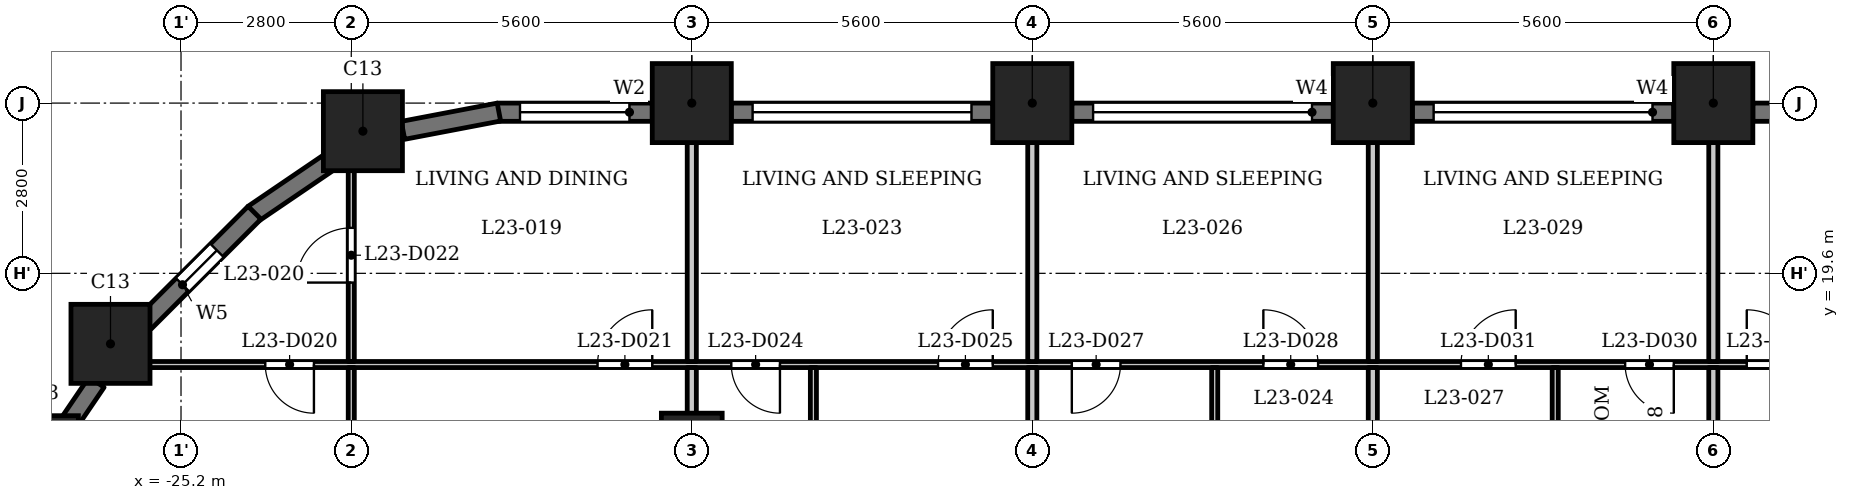
"""IFC4 building model, lengths in metres.
Left out: names, types, materials, properties, quantities, classifications, styles, units other than length and angle.
Written with IfcOpenShell. Run it as: python <this file> out.ifc"""

import sys

from ifc_helpers import new_model, si_unit, direction, frame, frame_2d, origin, origin_2d, place, context, subcontext, project, spatial, rectangle, extrude, element, fill, save


model = new_model("IFC4")
c1 = context("Model", 3, precision=1e-05, world=origin(), true_north=direction((0.0, 1.0)))
c2 = subcontext(c1, "Body", "Model", "MODEL_VIEW")
j1 = project(units=[si_unit("LENGTHUNIT", "METRE"), si_unit("PLANEANGLEUNIT", "RADIAN")], contexts=[c1])
p1 = place(None, origin())
s1 = spatial("IfcSite", under=j1, at=p1, CompositionType="ELEMENT")
p2 = place(p1, origin())
s2 = spatial("IfcBuilding", under=s1, at=p2, CompositionType="ELEMENT")
p3 = place(p2, frame((0.0, 0.0, 93.8)))
s3 = spatial("IfcBuildingStorey", under=s2, at=p3, CompositionType="ELEMENT", Elevation=93.8)
for number, where, z_axis, x_axis in (
    (1, (0.0, 22.4, 0.0), (0.0, 0.0, 1.0), (1.0, 0.0, 0.0)),
    (2, (-5.6, 22.4, 0.0), (0.0, 0.0, 1.0), (1.0, 0.0, 0.0)),
    (3, (-11.2, 22.4, 0.0), (0.0, 0.0, 1.0), (1.0, 0.0, 0.0)),
    (4, (-16.8, 22.4, 0.0), (0.0, 0.0, 1.0), (1.0, 0.0, 0.0)),
    (5, (-22.209, 21.938, 0.0), (0.0, 0.0, 1.0), (1.0, 0.0, 0.0)),
    (6, (-26.36, 18.44, 0.0), (0.0, 0.0, 1.0), (1.0, 0.0, 0.0)),
    (7, (-27.538, 16.609, 0.0), (0.0, 0.0, 1.0), (1.0, 0.0, 0.0)),
):
    element("IfcColumn", number, at=place(p3, frame(where, z_axis=z_axis, x_axis=x_axis)), inside=s3, PredefinedType="COLUMN", context=c2, shape_type="SweptSolid", body=[
        extrude(rectangle(XDim=1.3, YDim=1.3, at=origin_2d()), origin(), (0.0, 0.0, 1.0), 3.5),
    ])
p4 = place(p3, frame((-16.8, 16.8, 0.0), z_axis=(0.0, 0.0, 1.0), x_axis=(1.0, 0.0, 0.0)))
e8 = element("IfcColumn", 8, at=p4, inside=s3, PredefinedType="COLUMN", context=c2, shape_type="SweptSolid", body=[
    extrude(rectangle(XDim=1.0, YDim=1.0, at=origin_2d()), origin(), (0.0, 0.0, 1.0), 3.5),
])
p5 = place(p3, frame((4.95, 22.25, 0.0), z_axis=(0.0, 0.0, 1.0), x_axis=(-1.0, 0.0, 0.0)))
e9 = element("IfcWall", 9, at=p5, inside=s3, PredefinedType="SOLIDWALL", context=c2, shape_type="SweptSolid", body=[
    extrude(rectangle(XDim=4.3, YDim=0.3, at=frame_2d((2.15, 0.0))), origin(), (0.0, 0.0, 1.0), 2.4),
])
p6 = place(p5, frame((0.35, 0.0, 1.2)))
e10 = element("IfcOpeningElement", 10, at=p6, cuts=e9, PredefinedType="OPENING", context=c2, shape_type="SweptSolid", body=[
    extrude(rectangle(XDim=3.6, YDim=0.95, at=frame_2d((1.8, 0.475))), frame((0.0, 0.16, 0.0), z_axis=(0.0, -1.0, 0.0), x_axis=(1.0, 0.0, 0.0)), (0.0, 0.0, 1.0), 0.32),
])
p7 = place(p3, frame((-0.65, 22.25, 0.0), z_axis=(0.0, 0.0, 1.0), x_axis=(-1.0, 0.0, 0.0)))
e11 = element("IfcWall", 11, at=p7, inside=s3, PredefinedType="SOLIDWALL", context=c2, shape_type="SweptSolid", body=[
    extrude(rectangle(XDim=4.3, YDim=0.3, at=frame_2d((2.15, 0.0))), origin(), (0.0, 0.0, 1.0), 2.4),
])
p8 = place(p7, frame((0.35, 0.0, 1.2)))
e12 = element("IfcOpeningElement", 12, at=p8, cuts=e11, PredefinedType="OPENING", context=c2, shape_type="SweptSolid", body=[
    extrude(rectangle(XDim=3.6, YDim=0.95, at=frame_2d((1.8, 0.475))), frame((0.0, 0.16, 0.0), z_axis=(0.0, -1.0, 0.0), x_axis=(1.0, 0.0, 0.0)), (0.0, 0.0, 1.0), 0.32),
])
p9 = place(p3, frame((-6.25, 22.25, 0.0), z_axis=(0.0, 0.0, 1.0), x_axis=(-1.0, 0.0, 0.0)))
e13 = element("IfcWall", 13, at=p9, inside=s3, PredefinedType="SOLIDWALL", context=c2, shape_type="SweptSolid", body=[
    extrude(rectangle(XDim=4.3, YDim=0.3, at=frame_2d((2.15, 0.0))), origin(), (0.0, 0.0, 1.0), 2.4),
])
p10 = place(p9, frame((0.35, 0.0, 1.2)))
e14 = element("IfcOpeningElement", 14, at=p10, cuts=e13, PredefinedType="OPENING", context=c2, shape_type="SweptSolid", body=[
    extrude(rectangle(XDim=3.6, YDim=0.95, at=frame_2d((1.8, 0.475))), frame((0.0, 0.16, 0.0), z_axis=(0.0, -1.0, 0.0), x_axis=(1.0, 0.0, 0.0)), (0.0, 0.0, 1.0), 0.32),
])
p11 = place(p3, frame((-11.85, 22.25, 0.0), z_axis=(0.0, 0.0, 1.0), x_axis=(-1.0, 0.0, 0.0)))
e15 = element("IfcWall", 15, at=p11, inside=s3, PredefinedType="SOLIDWALL", context=c2, shape_type="SweptSolid", body=[
    extrude(rectangle(XDim=4.3, YDim=0.3, at=frame_2d((2.15, 0.0))), origin(), (0.0, 0.0, 1.0), 2.4),
])
p12 = place(p11, frame((0.35, 0.0, 1.2)))
e16 = element("IfcOpeningElement", 16, at=p12, cuts=e15, PredefinedType="OPENING", context=c2, shape_type="SweptSolid", body=[
    extrude(rectangle(XDim=3.6, YDim=0.95, at=frame_2d((1.8, 0.475))), frame((0.0, 0.16, 0.0), z_axis=(0.0, -1.0, 0.0), x_axis=(1.0, 0.0, 0.0)), (0.0, 0.0, 1.0), 0.32),
])
p13 = place(p3, frame((-17.45, 22.25, 0.0), z_axis=(0.0, 0.0, 1.0), x_axis=(-1.0, 0.0, 0.0)))
e17 = element("IfcWall", 17, at=p13, inside=s3, PredefinedType="SOLIDWALL", context=c2, shape_type="SweptSolid", body=[
    extrude(rectangle(XDim=2.55, YDim=0.3, at=frame_2d((1.275, 0.0))), origin(), (0.0, 0.0, 1.0), 2.4),
])
p14 = place(p13, frame((0.375, 0.0, 0.9)))
e18 = element("IfcOpeningElement", 18, at=p14, cuts=e17, PredefinedType="OPENING", context=c2, shape_type="SweptSolid", body=[
    extrude(rectangle(XDim=1.8, YDim=1.25, at=frame_2d((0.9, 0.625))), frame((0.0, 0.16, 0.0), z_axis=(0.0, -1.0, 0.0), x_axis=(1.0, 0.0, 0.0)), (0.0, 0.0, 1.0), 0.32),
])
for number, where, z_axis, x_axis in (
    (19, (-19.972, 22.253, 0.0), (0.0, 0.0, 1.0), (-0.982, -0.187, 0.0)),
    (20, (-22.684, 21.482, 0.0), (0.0, 0.0, 1.0), (-0.827, -0.562, 0.0)),
):
    element("IfcWall", number, at=place(p3, frame(where, z_axis=z_axis, x_axis=x_axis)), inside=s3, PredefinedType="SOLIDWALL", context=c2, shape_type="SweptSolid", body=[
        extrude(rectangle(XDim=1.606, YDim=0.3, at=frame_2d((0.803, 0.0))), origin(), (0.0, 0.0, 1.0), 2.4),
    ])
p15 = place(p3, frame((-23.991, 20.597, 0.0), z_axis=(0.0, 0.0, 1.0), x_axis=(-0.707106781187, -0.707106781187, 0.0)))
e21 = element("IfcWall", 21, at=p15, inside=s3, PredefinedType="SOLIDWALL", context=c2, shape_type="SweptSolid", body=[
    extrude(rectangle(XDim=2.55, YDim=0.3, at=frame_2d((1.275, 0.0))), origin(), (0.0, 0.0, 1.0), 2.4),
])
p16 = place(p15, frame((0.875, 0.0, 0.6)))
e22 = element("IfcOpeningElement", 22, at=p16, cuts=e21, PredefinedType="OPENING", context=c2, shape_type="SweptSolid", body=[
    extrude(rectangle(XDim=0.8, YDim=1.55, at=frame_2d((0.4, 0.775))), frame((0.0, 0.16, 0.0), z_axis=(0.0, -1.0, 0.0), x_axis=(1.0, 0.0, 0.0)), (0.0, 0.0, 1.0), 0.32),
])
p17 = place(p3, frame((-26.589, 17.81, 0.0), z_axis=(0.0, 0.0, 1.0), x_axis=(-0.562066330934, -0.827092159091, 0.0)))
e23 = element("IfcWall", 23, at=p17, inside=s3, PredefinedType="SOLIDWALL", context=c2, shape_type="SweptSolid", body=[
    extrude(rectangle(XDim=0.877, YDim=0.3, at=frame_2d((0.438, 0.0))), origin(), (0.0, 0.0, 1.0), 3.2),
])
p18 = place(p3, frame((-26.44, 18.1, 0.0), z_axis=(0.0, 0.0, 1.0), x_axis=(1.0, 0.0, 0.0)))
e24 = element("IfcWall", 24, at=p18, inside=s3, PredefinedType="PARTITIONING", context=c2, shape_type="SweptSolid", body=[
    extrude(rectangle(XDim=52.63, YDim=0.1, at=frame_2d((26.315, 0.0))), origin(), (0.0, 0.0, 1.0), 3.2),
])
p19 = place(p18, frame((2.626, 0.0, 0.0)))
e25 = element("IfcOpeningElement", 25, at=p19, cuts=e24, PredefinedType="OPENING", context=c2, shape_type="SweptSolid", body=[
    extrude(rectangle(XDim=0.8, YDim=2.1, at=frame_2d((0.4, 1.05))), frame((0.0, 0.06, 0.0), z_axis=(0.0, -1.0, 0.0), x_axis=(1.0, 0.0, 0.0)), (0.0, 0.0, 1.0), 0.12),
])
p20 = place(p18, frame((8.09, 0.0, 0.0)))
e26 = element("IfcOpeningElement", 26, at=p20, cuts=e24, PredefinedType="OPENING", context=c2, shape_type="SweptSolid", body=[
    extrude(rectangle(XDim=0.9, YDim=2.1, at=frame_2d((0.45, 1.05))), frame((0.0, 0.06, 0.0), z_axis=(0.0, -1.0, 0.0), x_axis=(1.0, 0.0, 0.0)), (0.0, 0.0, 1.0), 0.12),
])
p21 = place(p18, frame((10.29, 0.0, 0.0)))
e27 = element("IfcOpeningElement", 27, at=p21, cuts=e24, PredefinedType="OPENING", context=c2, shape_type="SweptSolid", body=[
    extrude(rectangle(XDim=0.8, YDim=2.1, at=frame_2d((0.4, 1.05))), frame((0.0, 0.06, 0.0), z_axis=(0.0, -1.0, 0.0), x_axis=(1.0, 0.0, 0.0)), (0.0, 0.0, 1.0), 0.12),
])
p22 = place(p18, frame((13.69, 0.0, 0.0)))
e28 = element("IfcOpeningElement", 28, at=p22, cuts=e24, PredefinedType="OPENING", context=c2, shape_type="SweptSolid", body=[
    extrude(rectangle(XDim=0.9, YDim=2.1, at=frame_2d((0.45, 1.05))), frame((0.0, 0.06, 0.0), z_axis=(0.0, -1.0, 0.0), x_axis=(1.0, 0.0, 0.0)), (0.0, 0.0, 1.0), 0.12),
])
p23 = place(p18, frame((15.89, 0.0, 0.0)))
e29 = element("IfcOpeningElement", 29, at=p23, cuts=e24, PredefinedType="OPENING", context=c2, shape_type="SweptSolid", body=[
    extrude(rectangle(XDim=0.8, YDim=2.1, at=frame_2d((0.4, 1.05))), frame((0.0, 0.06, 0.0), z_axis=(0.0, -1.0, 0.0), x_axis=(1.0, 0.0, 0.0)), (0.0, 0.0, 1.0), 0.12),
])
p24 = place(p18, frame((19.04, 0.0, 0.0)))
e30 = element("IfcOpeningElement", 30, at=p24, cuts=e24, PredefinedType="OPENING", context=c2, shape_type="SweptSolid", body=[
    extrude(rectangle(XDim=0.9, YDim=2.1, at=frame_2d((0.45, 1.05))), frame((0.0, 0.06, 0.0), z_axis=(0.0, -1.0, 0.0), x_axis=(1.0, 0.0, 0.0)), (0.0, 0.0, 1.0), 0.12),
])
p25 = place(p18, frame((24.99, 0.0, 0.0)))
e31 = element("IfcOpeningElement", 31, at=p25, cuts=e24, PredefinedType="OPENING", context=c2, shape_type="SweptSolid", body=[
    extrude(rectangle(XDim=0.8, YDim=2.1, at=frame_2d((0.4, 1.05))), frame((0.0, 0.06, 0.0), z_axis=(0.0, -1.0, 0.0), x_axis=(1.0, 0.0, 0.0)), (0.0, 0.0, 1.0), 0.12),
])
p26 = place(p18, frame((22.29, 0.0, 0.0)))
e32 = element("IfcOpeningElement", 32, at=p26, cuts=e24, PredefinedType="OPENING", context=c2, shape_type="SweptSolid", body=[
    extrude(rectangle(XDim=0.9, YDim=2.1, at=frame_2d((0.45, 1.05))), frame((0.0, 0.06, 0.0), z_axis=(0.0, -1.0, 0.0), x_axis=(1.0, 0.0, 0.0)), (0.0, 0.0, 1.0), 0.12),
])
p27 = place(p18, frame((32.69, 0.0, 0.0)))
e33 = element("IfcOpeningElement", 33, at=p27, cuts=e24, PredefinedType="OPENING", context=c2, shape_type="SweptSolid", body=[
    extrude(rectangle(XDim=0.8, YDim=2.1, at=frame_2d((0.4, 1.05))), frame((0.0, 0.06, 0.0), z_axis=(0.0, -1.0, 0.0), x_axis=(1.0, 0.0, 0.0)), (0.0, 0.0, 1.0), 0.12),
])
p28 = place(p18, frame((26.99, 0.0, 0.0)))
e34 = element("IfcOpeningElement", 34, at=p28, cuts=e24, PredefinedType="OPENING", context=c2, shape_type="SweptSolid", body=[
    extrude(rectangle(XDim=0.9, YDim=2.1, at=frame_2d((0.45, 1.05))), frame((0.0, 0.06, 0.0), z_axis=(0.0, -1.0, 0.0), x_axis=(1.0, 0.0, 0.0)), (0.0, 0.0, 1.0), 0.12),
])
p29 = place(p18, frame((41.29, 0.0, 0.0)))
e35 = element("IfcOpeningElement", 35, at=p29, cuts=e24, PredefinedType="OPENING", context=c2, shape_type="SweptSolid", body=[
    extrude(rectangle(XDim=0.8, YDim=2.1, at=frame_2d((0.4, 1.05))), frame((0.0, 0.06, 0.0), z_axis=(0.0, -1.0, 0.0), x_axis=(1.0, 0.0, 0.0)), (0.0, 0.0, 1.0), 0.12),
])
p30 = place(p18, frame((38.34, 0.0, 0.0)))
e36 = element("IfcOpeningElement", 36, at=p30, cuts=e24, PredefinedType="OPENING", context=c2, shape_type="SweptSolid", body=[
    extrude(rectangle(XDim=0.9, YDim=2.1, at=frame_2d((0.45, 1.05))), frame((0.0, 0.06, 0.0), z_axis=(0.0, -1.0, 0.0), x_axis=(1.0, 0.0, 0.0)), (0.0, 0.0, 1.0), 0.12),
])
p31 = place(p18, frame((50.74, 0.0, 0.0)))
e37 = element("IfcOpeningElement", 37, at=p31, cuts=e24, PredefinedType="OPENING", context=c2, shape_type="SweptSolid", body=[
    extrude(rectangle(XDim=0.8, YDim=2.1, at=frame_2d((0.4, 1.05))), frame((0.0, 0.06, 0.0), z_axis=(0.0, -1.0, 0.0), x_axis=(1.0, 0.0, 0.0)), (0.0, 0.0, 1.0), 0.12),
])
p32 = place(p18, frame((47.29, 0.0, 0.0)))
e38 = element("IfcOpeningElement", 38, at=p32, cuts=e24, PredefinedType="OPENING", context=c2, shape_type="SweptSolid", body=[
    extrude(rectangle(XDim=0.9, YDim=2.1, at=frame_2d((0.45, 1.05))), frame((0.0, 0.06, 0.0), z_axis=(0.0, -1.0, 0.0), x_axis=(1.0, 0.0, 0.0)), (0.0, 0.0, 1.0), 0.12),
])
p33 = place(p3, frame((-22.4, 15.475, 0.0), z_axis=(0.0, 0.0, 1.0), x_axis=(0.0, 1.0, 0.0)))
e39 = element("IfcWall", 39, at=p33, inside=s3, PredefinedType="PARTITIONING", context=c2, shape_type="SweptSolid", body=[
    extrude(rectangle(XDim=2.575, YDim=0.1, at=frame_2d((1.288, 0.0))), origin(), (0.0, 0.0, 1.0), 3.2),
])
p34 = place(p3, frame((-22.4, 18.15, 0.0), z_axis=(0.0, 0.0, 1.0), x_axis=(0.0, 1.0, 0.0)))
e40 = element("IfcWall", 40, at=p34, inside=s3, PredefinedType="PARTITIONING", context=c2, shape_type="SweptSolid", body=[
    extrude(rectangle(XDim=3.57, YDim=0.1, at=frame_2d((1.785, 0.0))), origin(), (0.0, 0.0, 1.0), 3.2),
])
p35 = place(p34, frame((1.298, 0.0, 0.0)))
e41 = element("IfcOpeningElement", 41, at=p35, cuts=e40, PredefinedType="OPENING", context=c2, shape_type="SweptSolid", body=[
    extrude(rectangle(XDim=0.9, YDim=2.1, at=frame_2d((0.45, 1.05))), frame((0.0, 0.06, 0.0), z_axis=(0.0, -1.0, 0.0), x_axis=(1.0, 0.0, 0.0)), (0.0, 0.0, 1.0), 0.12),
])
p36 = place(p3, frame((-16.8, 15.475, 0.0), z_axis=(0.0, 0.0, 1.0), x_axis=(0.0, 1.0, 0.0)))
e42 = element("IfcWall", 42, at=p36, inside=s3, PredefinedType="PARTITIONING", context=c2, shape_type="SweptSolid", body=[
    extrude(rectangle(XDim=2.575, YDim=0.15, at=frame_2d((1.288, 0.0))), origin(), (0.0, 0.0, 1.0), 3.2),
])
p37 = place(p3, frame((-16.8, 18.15, 0.0), z_axis=(0.0, 0.0, 1.0), x_axis=(0.0, 1.0, 0.0)))
e43 = element("IfcWall", 43, at=p37, inside=s3, PredefinedType="PARTITIONING", context=c2, shape_type="SweptSolid", body=[
    extrude(rectangle(XDim=4.88, YDim=0.15, at=frame_2d((2.44, 0.0))), origin(), (0.0, 0.0, 1.0), 3.2),
])
p38 = place(p3, frame((-14.8, 15.475, 0.0), z_axis=(0.0, 0.0, 1.0), x_axis=(0.0, 1.0, 0.0)))
e44 = element("IfcWall", 44, at=p38, inside=s3, PredefinedType="PARTITIONING", context=c2, shape_type="SweptSolid", body=[
    extrude(rectangle(XDim=2.575, YDim=0.1, at=frame_2d((1.288, 0.0))), origin(), (0.0, 0.0, 1.0), 3.2),
])
p39 = place(p3, frame((-11.2, 15.475, 0.0), z_axis=(0.0, 0.0, 1.0), x_axis=(0.0, 1.0, 0.0)))
e45 = element("IfcWall", 45, at=p39, inside=s3, PredefinedType="PARTITIONING", context=c2, shape_type="SweptSolid", body=[
    extrude(rectangle(XDim=2.575, YDim=0.15, at=frame_2d((1.288, 0.0))), origin(), (0.0, 0.0, 1.0), 3.2),
])
p40 = place(p3, frame((-11.2, 18.15, 0.0), z_axis=(0.0, 0.0, 1.0), x_axis=(0.0, 1.0, 0.0)))
e46 = element("IfcWall", 46, at=p40, inside=s3, PredefinedType="PARTITIONING", context=c2, shape_type="SweptSolid", body=[
    extrude(rectangle(XDim=4.88, YDim=0.15, at=frame_2d((2.44, 0.0))), origin(), (0.0, 0.0, 1.0), 3.2),
])
p41 = place(p3, frame((-8.2, 15.475, 0.0), z_axis=(0.0, 0.0, 1.0), x_axis=(0.0, 1.0, 0.0)))
e47 = element("IfcWall", 47, at=p41, inside=s3, PredefinedType="PARTITIONING", context=c2, shape_type="SweptSolid", body=[
    extrude(rectangle(XDim=2.575, YDim=0.1, at=frame_2d((1.288, 0.0))), origin(), (0.0, 0.0, 1.0), 3.2),
])
p42 = place(p3, frame((-5.6, 15.475, 0.0), z_axis=(0.0, 0.0, 1.0), x_axis=(0.0, 1.0, 0.0)))
e48 = element("IfcWall", 48, at=p42, inside=s3, PredefinedType="PARTITIONING", context=c2, shape_type="SweptSolid", body=[
    extrude(rectangle(XDim=2.575, YDim=0.15, at=frame_2d((1.288, 0.0))), origin(), (0.0, 0.0, 1.0), 3.2),
])
p43 = place(p3, frame((-5.6, 18.15, 0.0), z_axis=(0.0, 0.0, 1.0), x_axis=(0.0, 1.0, 0.0)))
e49 = element("IfcWall", 49, at=p43, inside=s3, PredefinedType="PARTITIONING", context=c2, shape_type="SweptSolid", body=[
    extrude(rectangle(XDim=4.88, YDim=0.15, at=frame_2d((2.44, 0.0))), origin(), (0.0, 0.0, 1.0), 3.2),
])
p44 = place(p3, frame((-2.6, 15.475, 0.0), z_axis=(0.0, 0.0, 1.0), x_axis=(0.0, 1.0, 0.0)))
e50 = element("IfcWall", 50, at=p44, inside=s3, PredefinedType="PARTITIONING", context=c2, shape_type="SweptSolid", body=[
    extrude(rectangle(XDim=2.575, YDim=0.1, at=frame_2d((1.288, 0.0))), origin(), (0.0, 0.0, 1.0), 3.2),
])
p45 = place(p3, frame((0.0, 15.475, 0.0), z_axis=(0.0, 0.0, 1.0), x_axis=(0.0, 1.0, 0.0)))
e51 = element("IfcWall", 51, at=p45, inside=s3, PredefinedType="PARTITIONING", context=c2, shape_type="SweptSolid", body=[
    extrude(rectangle(XDim=2.575, YDim=0.15, at=frame_2d((1.288, 0.0))), origin(), (0.0, 0.0, 1.0), 3.2),
])
p46 = place(p3, frame((0.0, 18.15, 0.0), z_axis=(0.0, 0.0, 1.0), x_axis=(0.0, 1.0, 0.0)))
e52 = element("IfcWall", 52, at=p46, inside=s3, PredefinedType="PARTITIONING", context=c2, shape_type="SweptSolid", body=[
    extrude(rectangle(XDim=4.88, YDim=0.15, at=frame_2d((2.44, 0.0))), origin(), (0.0, 0.0, 1.0), 3.2),
])
p47 = place(p19, origin())
e53 = element("IfcDoor", 53, at=p47, inside=s3, OperationType="SINGLE_SWING_RIGHT", PredefinedType="DOOR", context=c2, shape_type="SweptSolid", body=[
    extrude(rectangle(XDim=0.8, YDim=2.1, at=frame_2d((0.4, 1.05))), frame((0.0, 0.025, 0.0), z_axis=(0.0, -1.0, 0.0), x_axis=(1.0, 0.0, 0.0)), (0.0, 0.0, 1.0), 0.05),
])
fill(e25, e53)
p48 = place(p20, origin())
e54 = element("IfcDoor", 54, at=p48, inside=s3, OperationType="SINGLE_SWING_LEFT", PredefinedType="DOOR", context=c2, shape_type="SweptSolid", body=[
    extrude(rectangle(XDim=0.9, YDim=2.1, at=frame_2d((0.45, 1.05))), frame((0.0, 0.025, 0.0), z_axis=(0.0, -1.0, 0.0), x_axis=(1.0, 0.0, 0.0)), (0.0, 0.0, 1.0), 0.05),
])
fill(e26, e54)
p49 = place(p35, origin())
e55 = element("IfcDoor", 55, at=p49, inside=s3, OperationType="SINGLE_SWING_RIGHT", PredefinedType="DOOR", context=c2, shape_type="SweptSolid", body=[
    extrude(rectangle(XDim=0.9, YDim=2.1, at=frame_2d((0.45, 1.05))), frame((0.0, 0.025, 0.0), z_axis=(0.0, -1.0, 0.0), x_axis=(1.0, 0.0, 0.0)), (0.0, 0.0, 1.0), 0.05),
])
fill(e41, e55)
p50 = place(p21, origin())
e56 = element("IfcDoor", 56, at=p50, inside=s3, OperationType="SINGLE_SWING_RIGHT", PredefinedType="DOOR", context=c2, shape_type="SweptSolid", body=[
    extrude(rectangle(XDim=0.8, YDim=2.1, at=frame_2d((0.4, 1.05))), frame((0.0, 0.025, 0.0), z_axis=(0.0, -1.0, 0.0), x_axis=(1.0, 0.0, 0.0)), (0.0, 0.0, 1.0), 0.05),
])
fill(e27, e56)
p51 = place(p22, origin())
e57 = element("IfcDoor", 57, at=p51, inside=s3, OperationType="SINGLE_SWING_LEFT", PredefinedType="DOOR", context=c2, shape_type="SweptSolid", body=[
    extrude(rectangle(XDim=0.9, YDim=2.1, at=frame_2d((0.45, 1.05))), frame((0.0, 0.025, 0.0), z_axis=(0.0, -1.0, 0.0), x_axis=(1.0, 0.0, 0.0)), (0.0, 0.0, 1.0), 0.05),
])
fill(e28, e57)
p52 = place(p23, origin())
e58 = element("IfcDoor", 58, at=p52, inside=s3, OperationType="SINGLE_SWING_LEFT", PredefinedType="DOOR", context=c2, shape_type="SweptSolid", body=[
    extrude(rectangle(XDim=0.8, YDim=2.1, at=frame_2d((0.4, 1.05))), frame((0.0, 0.025, 0.0), z_axis=(0.0, -1.0, 0.0), x_axis=(1.0, 0.0, 0.0)), (0.0, 0.0, 1.0), 0.05),
])
fill(e29, e58)
p53 = place(p24, origin())
e59 = element("IfcDoor", 59, at=p53, inside=s3, OperationType="SINGLE_SWING_RIGHT", PredefinedType="DOOR", context=c2, shape_type="SweptSolid", body=[
    extrude(rectangle(XDim=0.9, YDim=2.1, at=frame_2d((0.45, 1.05))), frame((0.0, 0.025, 0.0), z_axis=(0.0, -1.0, 0.0), x_axis=(1.0, 0.0, 0.0)), (0.0, 0.0, 1.0), 0.05),
])
fill(e30, e59)
p54 = place(p25, origin())
e60 = element("IfcDoor", 60, at=p54, inside=s3, OperationType="SINGLE_SWING_RIGHT", PredefinedType="DOOR", context=c2, shape_type="SweptSolid", body=[
    extrude(rectangle(XDim=0.8, YDim=2.1, at=frame_2d((0.4, 1.05))), frame((0.0, 0.025, 0.0), z_axis=(0.0, -1.0, 0.0), x_axis=(1.0, 0.0, 0.0)), (0.0, 0.0, 1.0), 0.05),
])
fill(e31, e60)
p55 = place(p26, origin())
e61 = element("IfcDoor", 61, at=p55, inside=s3, OperationType="SINGLE_SWING_LEFT", PredefinedType="DOOR", context=c2, shape_type="SweptSolid", body=[
    extrude(rectangle(XDim=0.9, YDim=2.1, at=frame_2d((0.45, 1.05))), frame((0.0, 0.025, 0.0), z_axis=(0.0, -1.0, 0.0), x_axis=(1.0, 0.0, 0.0)), (0.0, 0.0, 1.0), 0.05),
])
fill(e32, e61)
p56 = place(p28, origin())
e62 = element("IfcDoor", 62, at=p56, inside=s3, OperationType="SINGLE_SWING_RIGHT", PredefinedType="DOOR", context=c2, shape_type="SweptSolid", body=[
    extrude(rectangle(XDim=0.9, YDim=2.1, at=frame_2d((0.45, 1.05))), frame((0.0, 0.025, 0.0), z_axis=(0.0, -1.0, 0.0), x_axis=(1.0, 0.0, 0.0)), (0.0, 0.0, 1.0), 0.05),
])
fill(e34, e62)
p57 = place(p8, origin())
e63 = element("IfcWindow", 63, at=p57, inside=s3, PartitioningType="SINGLE_PANEL", PredefinedType="WINDOW", context=c2, shape_type="SweptSolid", body=[
    extrude(rectangle(XDim=3.6, YDim=0.95, at=frame_2d((1.8, 0.475))), frame((0.0, 0.03, 0.0), z_axis=(0.0, -1.0, 0.0), x_axis=(1.0, 0.0, 0.0)), (0.0, 0.0, 1.0), 0.06),
])
fill(e12, e63)
p58 = place(p10, origin())
e64 = element("IfcWindow", 64, at=p58, inside=s3, PartitioningType="SINGLE_PANEL", PredefinedType="WINDOW", context=c2, shape_type="SweptSolid", body=[
    extrude(rectangle(XDim=3.6, YDim=0.95, at=frame_2d((1.8, 0.475))), frame((0.0, 0.03, 0.0), z_axis=(0.0, -1.0, 0.0), x_axis=(1.0, 0.0, 0.0)), (0.0, 0.0, 1.0), 0.06),
])
fill(e14, e64)
p59 = place(p12, origin())
e65 = element("IfcWindow", 65, at=p59, inside=s3, PartitioningType="SINGLE_PANEL", PredefinedType="WINDOW", context=c2, shape_type="SweptSolid", body=[
    extrude(rectangle(XDim=3.6, YDim=0.95, at=frame_2d((1.8, 0.475))), frame((0.0, 0.03, 0.0), z_axis=(0.0, -1.0, 0.0), x_axis=(1.0, 0.0, 0.0)), (0.0, 0.0, 1.0), 0.06),
])
fill(e16, e65)
p60 = place(p14, origin())
e66 = element("IfcWindow", 66, at=p60, inside=s3, PartitioningType="SINGLE_PANEL", PredefinedType="WINDOW", context=c2, shape_type="SweptSolid", body=[
    extrude(rectangle(XDim=1.8, YDim=1.25, at=frame_2d((0.9, 0.625))), frame((0.0, 0.03, 0.0), z_axis=(0.0, -1.0, 0.0), x_axis=(1.0, 0.0, 0.0)), (0.0, 0.0, 1.0), 0.06),
])
fill(e18, e66)
p61 = place(p16, origin())
e67 = element("IfcWindow", 67, at=p61, inside=s3, PartitioningType="SINGLE_PANEL", PredefinedType="WINDOW", context=c2, shape_type="SweptSolid", body=[
    extrude(rectangle(XDim=0.8, YDim=1.55, at=frame_2d((0.4, 0.775))), frame((0.0, 0.03, 0.0), z_axis=(0.0, -1.0, 0.0), x_axis=(1.0, 0.0, 0.0)), (0.0, 0.0, 1.0), 0.06),
])
fill(e22, e67)
save(model, sys.argv[1])
